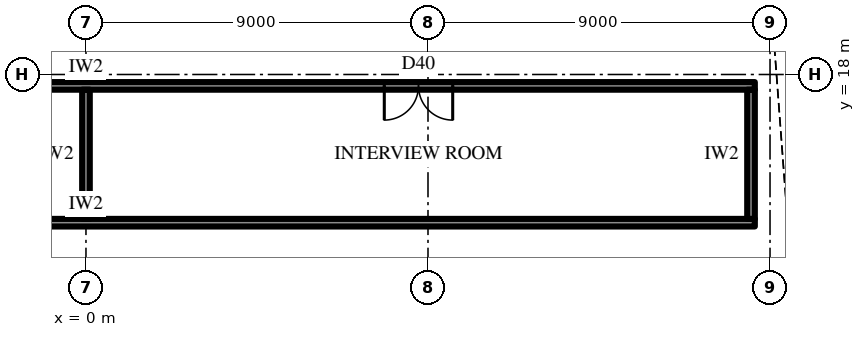
"""IFC4 building model, lengths in metres.
Left out: names, types, materials, properties, quantities, classifications, styles, units other than length and angle.
Written with IfcOpenShell. Run it as: python <this file> out.ifc"""

import sys

from ifc_helpers import new_model, si_unit, direction, frame, frame_2d, origin, place, context, subcontext, project, spatial, rectangle, extrude, element, fill, save


model = new_model("IFC4")
c1 = context("Model", 3, precision=1e-05, world=origin(), true_north=direction((0.0, 1.0)))
c2 = subcontext(c1, "Body", "Model", "MODEL_VIEW")
j1 = project(units=[si_unit("LENGTHUNIT", "METRE"), si_unit("PLANEANGLEUNIT", "RADIAN")], contexts=[c1])
p1 = place(None, origin())
s1 = spatial("IfcSite", under=j1, at=p1, CompositionType="ELEMENT")
p2 = place(p1, origin())
s2 = spatial("IfcBuilding", under=s1, at=p2, CompositionType="ELEMENT")
p3 = place(p2, frame((0.0, 0.0, 169.9)))
s3 = spatial("IfcBuildingStorey", under=s2, at=p3, CompositionType="ELEMENT", Elevation=169.9)
p4 = place(p3, frame((-17.6, 14.1, 0.0), z_axis=(0.0, 0.0, 1.0), x_axis=(1.0, 0.0, 0.0)))
e1 = element("IfcWall", 1, at=p4, inside=s3, PredefinedType="PARTITIONING", context=c2, shape_type="SweptSolid", body=[
    extrude(rectangle(XDim=35.2, YDim=0.2, at=frame_2d((17.6, 0.0))), origin(), (0.0, 0.0, 1.0), 4.0),
])
p5 = place(p3, frame((-17.6, 17.7, 0.0), z_axis=(0.0, 0.0, 1.0), x_axis=(1.0, 0.0, 0.0)))
e2 = element("IfcWall", 2, at=p5, inside=s3, PredefinedType="PARTITIONING", context=c2, shape_type="SweptSolid", body=[
    extrude(rectangle(XDim=35.2, YDim=0.2, at=frame_2d((17.6, 0.0))), origin(), (0.0, 0.0, 1.0), 4.0),
])
p6 = place(p5, frame((7.95, 0.0, 0.0)))
e3 = element("IfcOpeningElement", 3, at=p6, cuts=e2, PredefinedType="OPENING", context=c2, shape_type="SweptSolid", body=[
    extrude(rectangle(XDim=1.8, YDim=2.4, at=frame_2d((0.9, 1.2))), frame((0.0, 0.11, 0.0), z_axis=(0.0, -1.0, 0.0), x_axis=(1.0, 0.0, 0.0)), (0.0, 0.0, 1.0), 0.22),
])
p7 = place(p5, frame((25.45, 0.0, 0.0)))
e4 = element("IfcOpeningElement", 4, at=p7, cuts=e2, PredefinedType="OPENING", context=c2, shape_type="SweptSolid", body=[
    extrude(rectangle(XDim=1.8, YDim=2.4, at=frame_2d((0.9, 1.2))), frame((0.0, 0.11, 0.0), z_axis=(0.0, -1.0, 0.0), x_axis=(1.0, 0.0, 0.0)), (0.0, 0.0, 1.0), 0.22),
])
p8 = place(p3, frame((0.0, 14.2, 0.0), z_axis=(0.0, 0.0, 1.0), x_axis=(0.0, 1.0, 0.0)))
e5 = element("IfcWall", 5, at=p8, inside=s3, PredefinedType="PARTITIONING", context=c2, shape_type="SweptSolid", body=[
    extrude(rectangle(XDim=3.4, YDim=0.2, at=frame_2d((1.7, 0.0))), origin(), (0.0, 0.0, 1.0), 2.992),
])
p9 = place(p3, frame((17.5, 14.2, 0.0), z_axis=(0.0, 0.0, 1.0), x_axis=(0.0, 1.0, 0.0)))
e6 = element("IfcWall", 6, at=p9, inside=s3, PredefinedType="PARTITIONING", context=c2, shape_type="SweptSolid", body=[
    extrude(rectangle(XDim=3.4, YDim=0.2, at=frame_2d((1.7, 0.0))), origin(), (0.0, 0.0, 1.0), 4.0),
])
p10 = place(p7, frame((1.8, 0.0, 0.0), z_axis=(0.0, 0.0, 1.0), x_axis=(-1.0, 0.0, 0.0)))
e7 = element("IfcDoor", 7, at=p10, inside=s3, OperationType="DOUBLE_DOOR_SINGLE_SWING", PredefinedType="DOOR", context=c2, shape_type="SweptSolid", body=[
    extrude(rectangle(XDim=1.8, YDim=2.4, at=frame_2d((0.9, 1.2))), frame((0.0, 0.025, 0.0), z_axis=(0.0, -1.0, 0.0), x_axis=(1.0, 0.0, 0.0)), (0.0, 0.0, 1.0), 0.05),
])
fill(e4, e7)
save(model, sys.argv[1])
